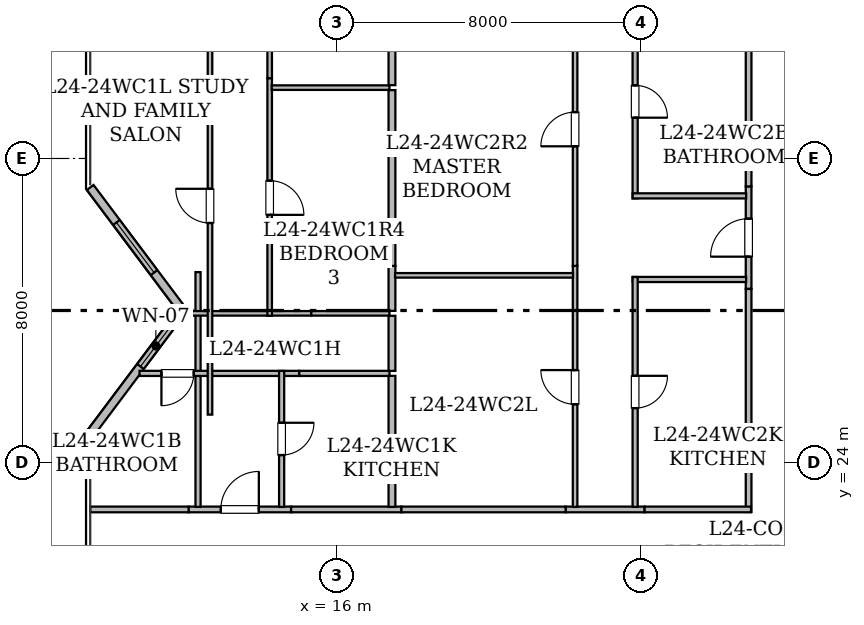
"""IFC4 building model, lengths in metres.
Left out: names, types, materials, properties, quantities, classifications, styles, units other than length and angle.
Written with IfcOpenShell. Run it as: python <this file> out.ifc"""

import sys

from ifc_helpers import new_model, si_unit, direction, frame, frame_2d, origin, place, context, subcontext, project, spatial, rectangle, extrude, element, fill, save


model = new_model("IFC4")
c1 = context("Model", 3, precision=1e-05, world=origin(), true_north=direction((0.0, 1.0)))
c2 = subcontext(c1, "Body", "Model", "MODEL_VIEW")
j1 = project(units=[si_unit("LENGTHUNIT", "METRE"), si_unit("PLANEANGLEUNIT", "RADIAN")], contexts=[c1])
p1 = place(None, origin())
s1 = spatial("IfcSite", under=j1, at=p1, CompositionType="ELEMENT")
p2 = place(p1, origin())
s2 = spatial("IfcBuilding", under=s1, at=p2, CompositionType="ELEMENT")
p3 = place(p2, frame((0.0, 0.0, 98.25)))
s3 = spatial("IfcBuildingStorey", under=s2, at=p3, CompositionType="ELEMENT", Elevation=98.25)
p4 = place(p3, frame((9.544, 24.808, 0.0), z_axis=(0.0, 0.0, 1.0), x_axis=(0.600019580308, 0.799985314394, 0.0)))
e1 = element("IfcWall", 1, at=p4, inside=s3, PredefinedType="STANDARD", context=c2, shape_type="SweptSolid", body=[
    extrude(rectangle(XDim=3.99, YDim=0.22, at=frame_2d((1.995, 0.0))), origin(), (0.0, 0.0, 1.0), 3.43),
])
p5 = place(p4, frame((2.147, 0.0, 0.85)))
e2 = element("IfcOpeningElement", 2, at=p5, cuts=e1, PredefinedType="OPENING", context=c2, shape_type="SweptSolid", body=[
    extrude(rectangle(XDim=1.35, YDim=1.5, at=frame_2d((0.675, 0.75))), frame((0.0, 0.12, 0.0), z_axis=(0.0, -1.0, 0.0), x_axis=(1.0, 0.0, 0.0)), (0.0, 0.0, 1.0), 0.24),
])
p6 = place(p3, frame((11.881, 28.077, 0.0), z_axis=(0.0, 0.0, 1.0), x_axis=(-0.600158184825, 0.799881336942, 0.0)))
e3 = element("IfcWall", 3, at=p6, inside=s3, PredefinedType="STANDARD", context=c2, shape_type="SweptSolid", body=[
    extrude(rectangle(XDim=3.951, YDim=0.22, at=frame_2d((1.975, 0.0))), origin(), (0.0, 0.0, 1.0), 3.43),
])
p7 = place(p6, frame((1.15, 0.0, 0.85)))
e4 = element("IfcOpeningElement", 4, at=p7, cuts=e3, PredefinedType="OPENING", context=c2, shape_type="SweptSolid", body=[
    extrude(rectangle(XDim=1.65, YDim=1.55, at=frame_2d((0.825, 0.775))), frame((0.0, 0.12, 0.0), z_axis=(0.0, -1.0, 0.0), x_axis=(1.0, 0.0, 0.0)), (0.0, 0.0, 1.0), 0.24),
])
p8 = place(p3, frame((12.098, 22.765, 0.0), z_axis=(0.0, 0.0, 1.0), x_axis=(1.0, 0.0, 0.0)))
e5 = element("IfcWall", 5, at=p8, inside=s3, PredefinedType="STANDARD", context=c2, shape_type="SweptSolid", body=[
    extrude(rectangle(XDim=2.698, YDim=0.15, at=frame_2d((1.349, 0.0))), origin(), (0.0, 0.0, 1.0), 2.876),
])
p9 = place(p8, frame((0.849, 0.0, 0.0)))
e6 = element("IfcOpeningElement", 6, at=p9, cuts=e5, PredefinedType="OPENING", context=c2, shape_type="SweptSolid", body=[
    extrude(rectangle(XDim=1.0, YDim=2.15, at=frame_2d((0.5, 1.075))), frame((0.0, 0.085, 0.0), z_axis=(0.0, -1.0, 0.0), x_axis=(1.0, 0.0, 0.0)), (0.0, 0.0, 1.0), 0.17),
])
p10 = place(p3, frame((9.51, 22.765, 0.0), z_axis=(0.0, 0.0, 1.0), x_axis=(1.0, 0.0, 0.0)))
e7 = element("IfcWall", 7, at=p10, inside=s3, PredefinedType="STANDARD", context=c2, shape_type="SweptSolid", body=[
    extrude(rectangle(XDim=2.588, YDim=0.15, at=frame_2d((1.294, 0.0))), origin(), (0.0, 0.0, 1.0), 2.876),
])
p11 = place(p3, frame((14.796, 22.765, 0.0), z_axis=(0.0, 0.0, 1.0), x_axis=(1.0, 0.0, 0.0)))
e8 = element("IfcWall", 8, at=p11, inside=s3, PredefinedType="STANDARD", context=c2, shape_type="SweptSolid", body=[
    extrude(rectangle(XDim=2.903, YDim=0.15, at=frame_2d((1.452, 0.0))), origin(), (0.0, 0.0, 1.0), 3.43),
])
p12 = place(p3, frame((26.835, 28.567, 0.0), z_axis=(0.0, 0.0, 1.0), x_axis=(0.0, 1.0, 0.0)))
e9 = element("IfcWall", 9, at=p12, inside=s3, PredefinedType="STANDARD", context=c2, shape_type="SweptSolid", body=[
    extrude(rectangle(XDim=2.698, YDim=0.15, at=frame_2d((1.349, 0.0))), origin(), (0.0, 0.0, 1.0), 3.43),
])
p13 = place(p12, frame((0.849, 0.0, 0.0)))
e10 = element("IfcOpeningElement", 10, at=p13, cuts=e9, PredefinedType="OPENING", context=c2, shape_type="SweptSolid", body=[
    extrude(rectangle(XDim=1.0, YDim=2.15, at=frame_2d((0.5, 1.075))), frame((0.0, 0.085, 0.0), z_axis=(0.0, -1.0, 0.0), x_axis=(1.0, 0.0, 0.0)), (0.0, 0.0, 1.0), 0.17),
])
p14 = place(p3, frame((22.02, 22.765, 0.0), z_axis=(0.0, 0.0, 1.0), x_axis=(1.0, 0.0, 0.0)))
e11 = element("IfcWall", 11, at=p14, inside=s3, PredefinedType="STANDARD", context=c2, shape_type="SweptSolid", body=[
    extrude(rectangle(XDim=2.078, YDim=0.15, at=frame_2d((1.039, 0.0))), origin(), (0.0, 0.0, 1.0), 3.43),
])
p15 = place(p3, frame((26.835, 31.265, 0.0), z_axis=(0.0, 0.0, 1.0), x_axis=(0.0, 1.0, 0.0)))
e12 = element("IfcWall", 12, at=p15, inside=s3, PredefinedType="STANDARD", context=c2, shape_type="SweptSolid", body=[
    extrude(rectangle(XDim=4.467, YDim=0.15, at=frame_2d((2.233, 0.0))), origin(), (0.0, 0.0, 1.0), 3.43),
])
p16 = place(p3, frame((26.835, 22.7, 0.0), z_axis=(0.0, 0.0, 1.0), x_axis=(0.0, 1.0, 0.0)))
e13 = element("IfcWall", 13, at=p16, inside=s3, PredefinedType="STANDARD", context=c2, shape_type="SweptSolid", body=[
    extrude(rectangle(XDim=5.867, YDim=0.15, at=frame_2d((2.934, 0.0))), origin(), (0.0, 0.0, 1.0), 2.961),
])
p17 = place(p3, frame((24.098, 22.765, 0.0), z_axis=(0.0, 0.0, 1.0), x_axis=(1.0, 0.0, 0.0)))
e14 = element("IfcWall", 14, at=p17, inside=s3, PredefinedType="STANDARD", context=c2, shape_type="SweptSolid", body=[
    extrude(rectangle(XDim=2.8, YDim=0.15, at=frame_2d((1.4, 0.0))), origin(), (0.0, 0.0, 1.0), 3.43),
])
p18 = place(p3, frame((17.699, 22.765, 0.0), z_axis=(0.0, 0.0, 1.0), x_axis=(1.0, 0.0, 0.0)))
e15 = element("IfcWall", 15, at=p18, inside=s3, PredefinedType="STANDARD", context=c2, shape_type="SweptSolid", body=[
    extrude(rectangle(XDim=4.321, YDim=0.15, at=frame_2d((2.161, 0.0))), origin(), (0.0, 0.0, 1.0), 2.647),
])
p19 = place(p3, frame((12.347, 22.832, 0.0), z_axis=(0.0, 0.0, 1.0), x_axis=(0.0, 1.0, 0.0)))
e16 = element("IfcWall", 16, at=p19, inside=s3, PredefinedType="PARTITIONING", context=c2, shape_type="SweptSolid", body=[
    extrude(rectangle(XDim=6.178, YDim=0.135, at=frame_2d((3.089, 0.0))), origin(), (0.0, 0.0, 1.0), 2.876),
])
p20 = place(p3, frame((15.012, 26.345, 0.0), z_axis=(0.0, 0.0, 1.0), x_axis=(-1.0, 0.0, 0.0)))
e17 = element("IfcWall", 17, at=p20, inside=s3, PredefinedType="PARTITIONING", context=c2, shape_type="SweptSolid", body=[
    extrude(rectangle(XDim=4.204, YDim=0.135, at=frame_2d((2.102, 0.0))), origin(), (0.0, 0.0, 1.0), 2.876),
])
p21 = place(p20, frame((2.778, 0.0, 0.0)))
e18 = element("IfcOpeningElement", 18, at=p21, cuts=e17, PredefinedType="OPENING", context=c2, shape_type="SweptSolid", body=[
    extrude(rectangle(XDim=0.85, YDim=2.1, at=frame_2d((0.425, 1.05))), frame((0.0, 0.077, 0.0), z_axis=(0.0, -1.0, 0.0), x_axis=(1.0, 0.0, 0.0)), (0.0, 0.0, 1.0), 0.155),
])
p22 = place(p3, frame((17.385, 26.345, 0.0), z_axis=(0.0, 0.0, 1.0), x_axis=(-1.0, 0.0, 0.0)))
e19 = element("IfcWall", 19, at=p22, inside=s3, PredefinedType="PARTITIONING", context=c2, shape_type="SweptSolid", body=[
    extrude(rectangle(XDim=2.373, YDim=0.135, at=frame_2d((1.187, 0.0))), origin(), (0.0, 0.0, 1.0), 3.43),
])
p23 = place(p3, frame((14.547, 26.41, 0.0), z_axis=(0.0, 0.0, 1.0), x_axis=(0.0, -1.0, 0.0)))
e20 = element("IfcWall", 20, at=p23, inside=s3, PredefinedType="PARTITIONING", context=c2, shape_type="SweptSolid", body=[
    extrude(rectangle(XDim=3.578, YDim=0.135, at=frame_2d((1.789, 0.0))), origin(), (0.0, 0.0, 1.0), 3.43),
])
p24 = place(p23, frame((1.364, 0.0, 0.0)))
e21 = element("IfcOpeningElement", 21, at=p24, cuts=e20, PredefinedType="OPENING", context=c2, shape_type="SweptSolid", body=[
    extrude(rectangle(XDim=0.85, YDim=2.1, at=frame_2d((0.425, 1.05))), frame((0.0, 0.077, 0.0), z_axis=(0.0, -1.0, 0.0), x_axis=(1.0, 0.0, 0.0)), (0.0, 0.0, 1.0), 0.155),
])
p25 = place(p3, frame((11.894, 27.925, 0.0), z_axis=(0.0, 0.0, 1.0), x_axis=(1.0, 0.0, 0.0)))
e22 = element("IfcWall", 22, at=p25, inside=s3, PredefinedType="PARTITIONING", context=c2, shape_type="SweptSolid", body=[
    extrude(rectangle(XDim=3.433, YDim=0.12, at=frame_2d((1.716, 0.0))), origin(), (0.0, 0.0, 1.0), 2.876),
])
p26 = place(p3, frame((12.662, 25.26, 0.0), z_axis=(0.0, 0.0, 1.0), x_axis=(0.0, 1.0, 0.0)))
e23 = element("IfcWall", 23, at=p26, inside=s3, PredefinedType="PARTITIONING", context=c2, shape_type="SweptSolid", body=[
    extrude(rectangle(XDim=8.567, YDim=0.12, at=frame_2d((4.283, 0.0))), origin(), (0.0, 0.0, 1.0), 2.687),
])
p27 = place(p26, frame((5.042, 0.0, 0.0)))
e24 = element("IfcOpeningElement", 24, at=p27, cuts=e23, PredefinedType="OPENING", context=c2, shape_type="SweptSolid", body=[
    extrude(rectangle(XDim=0.9, YDim=2.1, at=frame_2d((0.45, 1.05))), frame((0.0, 0.07, 0.0), z_axis=(0.0, -1.0, 0.0), x_axis=(1.0, 0.0, 0.0)), (0.0, 0.0, 1.0), 0.14),
])
p28 = place(p3, frame((12.662, 33.827, 0.0), z_axis=(0.0, 0.0, 1.0), x_axis=(0.0, 1.0, 0.0)))
e25 = element("IfcWall", 25, at=p28, inside=s3, PredefinedType="PARTITIONING", context=c2, shape_type="SweptSolid", body=[
    extrude(rectangle(XDim=6.817, YDim=0.12, at=frame_2d((3.409, 0.0))), origin(), (0.0, 0.0, 1.0), 2.687),
])
p29 = place(p28, frame((2.055, 0.0, 0.0)))
e26 = element("IfcOpeningElement", 26, at=p29, cuts=e25, PredefinedType="OPENING", context=c2, shape_type="SweptSolid", body=[
    extrude(rectangle(XDim=0.9, YDim=2.1, at=frame_2d((0.45, 1.05))), frame((0.0, 0.07, 0.0), z_axis=(0.0, -1.0, 0.0), x_axis=(1.0, 0.0, 0.0)), (0.0, 0.0, 1.0), 0.14),
])
p30 = place(p3, frame((15.327, 27.925, 0.0), z_axis=(0.0, 0.0, 1.0), x_axis=(1.0, 0.0, 0.0)))
e27 = element("IfcWall", 27, at=p30, inside=s3, PredefinedType="PARTITIONING", context=c2, shape_type="SweptSolid", body=[
    extrude(rectangle(XDim=2.058, YDim=0.12, at=frame_2d((1.029, 0.0))), origin(), (0.0, 0.0, 1.0), 3.43),
])
p31 = place(p3, frame((14.232, 34.113, 0.0), z_axis=(0.0, 0.0, 1.0), x_axis=(0.0, -1.0, 0.0)))
e28 = element("IfcWall", 28, at=p31, inside=s3, PredefinedType="PARTITIONING", context=c2, shape_type="SweptSolid", body=[
    extrude(rectangle(XDim=6.253, YDim=0.12, at=frame_2d((3.126, 0.0))), origin(), (0.0, 0.0, 1.0), 2.687),
])
p32 = place(p31, frame((2.697, 0.0, 0.0)))
e29 = element("IfcOpeningElement", 29, at=p32, cuts=e28, PredefinedType="OPENING", context=c2, shape_type="SweptSolid", body=[
    extrude(rectangle(XDim=0.9, YDim=2.1, at=frame_2d((0.45, 1.05))), frame((0.0, 0.07, 0.0), z_axis=(0.0, -1.0, 0.0), x_axis=(1.0, 0.0, 0.0)), (0.0, 0.0, 1.0), 0.14),
])
p33 = place(p3, frame((14.232, 41.28, 0.0), z_axis=(0.0, 0.0, 1.0), x_axis=(0.0, -1.0, 0.0)))
e30 = element("IfcWall", 30, at=p33, inside=s3, PredefinedType="PARTITIONING", context=c2, shape_type="SweptSolid", body=[
    extrude(rectangle(XDim=7.167, YDim=0.12, at=frame_2d((3.583, 0.0))), origin(), (0.0, 0.0, 1.0), 2.687),
])
p34 = place(p33, frame((3.154, 0.0, 0.0)))
e31 = element("IfcOpeningElement", 31, at=p34, cuts=e30, PredefinedType="OPENING", context=c2, shape_type="SweptSolid", body=[
    extrude(rectangle(XDim=0.9, YDim=2.1, at=frame_2d((0.45, 1.05))), frame((0.0, 0.07, 0.0), z_axis=(0.0, -1.0, 0.0), x_axis=(1.0, 0.0, 0.0)), (0.0, 0.0, 1.0), 0.14),
])
p35 = place(p3, frame((17.45, 27.86, 0.0), z_axis=(0.0, 0.0, 1.0), x_axis=(0.0, -1.0, 0.0)))
e32 = element("IfcWall", 32, at=p35, inside=s3, PredefinedType="STANDARD", context=c2, shape_type="SweptSolid", body=[
    extrude(rectangle(XDim=1.45, YDim=0.18, at=frame_2d((0.725, 0.0))), origin(), (0.0, 0.0, 1.0), 3.43),
])
p36 = place(p3, frame((17.45, 26.28, 0.0), z_axis=(0.0, 0.0, 1.0), x_axis=(0.0, -1.0, 0.0)))
e33 = element("IfcWall", 33, at=p36, inside=s3, PredefinedType="STANDARD", context=c2, shape_type="SweptSolid", body=[
    extrude(rectangle(XDim=3.448, YDim=0.18, at=frame_2d((1.724, 0.0))), origin(), (0.0, 0.0, 1.0), 3.43),
])
p37 = place(p3, frame((9.51, 33.578, 0.0), z_axis=(0.0, 0.0, 1.0), x_axis=(1.0, 0.0, 0.0)))
e34 = element("IfcWall", 34, at=p37, inside=s3, PredefinedType="PARTITIONING", context=c2, shape_type="SweptSolid", body=[
    extrude(rectangle(XDim=3.098, YDim=0.12, at=frame_2d((1.549, 0.0))), origin(), (0.0, 0.0, 1.0), 2.687),
])
p38 = place(p3, frame((14.286, 33.864, 0.0), z_axis=(0.0, 0.0, 1.0), x_axis=(1.0, 0.0, 0.0)))
e35 = element("IfcWall", 35, at=p38, inside=s3, PredefinedType="PARTITIONING", context=c2, shape_type="SweptSolid", body=[
    extrude(rectangle(XDim=3.099, YDim=0.12, at=frame_2d((1.55, 0.0))), origin(), (0.0, 0.0, 1.0), 3.43),
])
p39 = place(p3, frame((17.45, 29.174, 0.0), z_axis=(0.0, 0.0, 1.0), x_axis=(0.0, -1.0, 0.0)))
e36 = element("IfcWall", 36, at=p39, inside=s3, PredefinedType="STANDARD", context=c2, shape_type="SweptSolid", body=[
    extrude(rectangle(XDim=1.184, YDim=0.18, at=frame_2d((0.592, 0.0))), origin(), (0.0, 0.0, 1.0), 3.43),
])
p40 = place(p3, frame((17.45, 33.799, 0.0), z_axis=(0.0, 0.0, 1.0), x_axis=(0.0, -1.0, 0.0)))
e37 = element("IfcWall", 37, at=p40, inside=s3, PredefinedType="STANDARD", context=c2, shape_type="SweptSolid", body=[
    extrude(rectangle(XDim=4.625, YDim=0.18, at=frame_2d((2.312, 0.0))), origin(), (0.0, 0.0, 1.0), 2.687),
])
p41 = place(p3, frame((17.45, 36.409, 0.0), z_axis=(0.0, 0.0, 1.0), x_axis=(0.0, -1.0, 0.0)))
e38 = element("IfcWall", 38, at=p41, inside=s3, PredefinedType="STANDARD", context=c2, shape_type="SweptSolid", body=[
    extrude(rectangle(XDim=2.48, YDim=0.18, at=frame_2d((1.24, 0.0))), origin(), (0.0, 0.0, 1.0), 3.43),
])
p42 = place(p3, frame((23.849, 36.046, 0.0), z_axis=(0.0, 0.0, 1.0), x_axis=(0.0, -1.0, 0.0)))
e39 = element("IfcWall", 39, at=p42, inside=s3, PredefinedType="PARTITIONING", context=c2, shape_type="SweptSolid", body=[
    extrude(rectangle(XDim=5.095, YDim=0.135, at=frame_2d((2.547, 0.0))), origin(), (0.0, 0.0, 1.0), 3.43),
])
p43 = place(p42, frame((2.123, 0.0, 0.0)))
e40 = element("IfcOpeningElement", 40, at=p43, cuts=e39, PredefinedType="OPENING", context=c2, shape_type="SweptSolid", body=[
    extrude(rectangle(XDim=0.85, YDim=2.1, at=frame_2d((0.425, 1.05))), frame((0.0, 0.077, 0.0), z_axis=(0.0, -1.0, 0.0), x_axis=(1.0, 0.0, 0.0)), (0.0, 0.0, 1.0), 0.155),
])
for number, where, z_axis, x_axis in (
    (41, (23.784, 31.016, 0.0), (0.0, 0.0, 1.0), (1.0, 0.0, 0.0)),
    (42, (26.77, 28.816, 0.0), (0.0, 0.0, 1.0), (-1.0, 0.0, 0.0)),
):
    element("IfcWall", number, at=place(p3, frame(where, z_axis=z_axis, x_axis=x_axis)), inside=s3, PredefinedType="PARTITIONING", context=c2, shape_type="SweptSolid", body=[
        extrude(rectangle(XDim=2.986, YDim=0.135, at=frame_2d((1.493, 0.0))), origin(), (0.0, 0.0, 1.0), 3.43),
    ])
p44 = place(p3, frame((23.849, 28.881, 0.0), z_axis=(0.0, 0.0, 1.0), x_axis=(0.0, -1.0, 0.0)))
e43 = element("IfcWall", 43, at=p44, inside=s3, PredefinedType="PARTITIONING", context=c2, shape_type="SweptSolid", body=[
    extrude(rectangle(XDim=6.049, YDim=0.135, at=frame_2d((3.024, 0.0))), origin(), (0.0, 0.0, 1.0), 2.961),
])
p45 = place(p44, frame((2.6, 0.0, 0.0)))
e44 = element("IfcOpeningElement", 44, at=p45, cuts=e43, PredefinedType="OPENING", context=c2, shape_type="SweptSolid", body=[
    extrude(rectangle(XDim=0.85, YDim=2.1, at=frame_2d((0.425, 1.05))), frame((0.0, 0.077, 0.0), z_axis=(0.0, -1.0, 0.0), x_axis=(1.0, 0.0, 0.0)), (0.0, 0.0, 1.0), 0.155),
])
p46 = place(p3, frame((22.269, 22.832, 0.0), z_axis=(0.0, 0.0, 1.0), x_axis=(0.0, 1.0, 0.0)))
e45 = element("IfcWall", 45, at=p46, inside=s3, PredefinedType="PARTITIONING", context=c2, shape_type="SweptSolid", body=[
    extrude(rectangle(XDim=6.342, YDim=0.12, at=frame_2d((3.171, 0.0))), origin(), (0.0, 0.0, 1.0), 2.961),
])
p47 = place(p46, frame((2.7, 0.0, 0.0)))
e46 = element("IfcOpeningElement", 46, at=p47, cuts=e45, PredefinedType="OPENING", context=c2, shape_type="SweptSolid", body=[
    extrude(rectangle(XDim=0.9, YDim=2.1, at=frame_2d((0.45, 1.05))), frame((0.0, 0.07, 0.0), z_axis=(0.0, -1.0, 0.0), x_axis=(1.0, 0.0, 0.0)), (0.0, 0.0, 1.0), 0.14),
])
p48 = place(p3, frame((22.269, 29.174, 0.0), z_axis=(0.0, 0.0, 1.0), x_axis=(0.0, 1.0, 0.0)))
e47 = element("IfcWall", 47, at=p48, inside=s3, PredefinedType="PARTITIONING", context=c2, shape_type="SweptSolid", body=[
    extrude(rectangle(XDim=7.235, YDim=0.12, at=frame_2d((3.617, 0.0))), origin(), (0.0, 0.0, 1.0), 3.43),
])
p49 = place(p48, frame((3.146, 0.0, 0.0)))
e48 = element("IfcOpeningElement", 48, at=p49, cuts=e47, PredefinedType="OPENING", context=c2, shape_type="SweptSolid", body=[
    extrude(rectangle(XDim=0.9, YDim=2.1, at=frame_2d((0.45, 1.05))), frame((0.0, 0.07, 0.0), z_axis=(0.0, -1.0, 0.0), x_axis=(1.0, 0.0, 0.0)), (0.0, 0.0, 1.0), 0.14),
])
p50 = place(p3, frame((17.532, 28.925, 0.0), z_axis=(0.0, 0.0, 1.0), x_axis=(1.0, 0.0, 0.0)))
e49 = element("IfcWall", 49, at=p50, inside=s3, PredefinedType="PARTITIONING", context=c2, shape_type="SweptSolid", body=[
    extrude(rectangle(XDim=4.683, YDim=0.12, at=frame_2d((2.342, 0.0))), origin(), (0.0, 0.0, 1.0), 2.647),
])
p51 = place(p5, origin())
e50 = element("IfcWindow", 50, at=p51, inside=s3, PartitioningType="SINGLE_PANEL", PredefinedType="WINDOW", context=c2, shape_type="SweptSolid", body=[
    extrude(rectangle(XDim=1.35, YDim=1.5, at=frame_2d((0.675, 0.75))), frame((0.0, 0.03, 0.0), z_axis=(0.0, -1.0, 0.0), x_axis=(1.0, 0.0, 0.0)), (0.0, 0.0, 1.0), 0.06),
])
fill(e2, e50)
p52 = place(p7, origin())
e51 = element("IfcWindow", 51, at=p52, inside=s3, PartitioningType="SINGLE_PANEL", PredefinedType="WINDOW", context=c2, shape_type="SweptSolid", body=[
    extrude(rectangle(XDim=1.65, YDim=1.55, at=frame_2d((0.825, 0.775))), frame((0.0, 0.03, 0.0), z_axis=(0.0, -1.0, 0.0), x_axis=(1.0, 0.0, 0.0)), (0.0, 0.0, 1.0), 0.06),
])
fill(e4, e51)
p53 = place(p9, origin())
e52 = element("IfcDoor", 52, at=p53, inside=s3, OperationType="SINGLE_SWING_RIGHT", PredefinedType="DOOR", context=c2, shape_type="SweptSolid", body=[
    extrude(rectangle(XDim=1.0, YDim=2.15, at=frame_2d((0.5, 1.075))), frame((0.0, 0.025, 0.0), z_axis=(0.0, -1.0, 0.0), x_axis=(1.0, 0.0, 0.0)), (0.0, 0.0, 1.0), 0.05),
])
fill(e6, e52)
p54 = place(p13, origin())
e53 = element("IfcDoor", 53, at=p54, inside=s3, OperationType="SINGLE_SWING_LEFT", PredefinedType="DOOR", context=c2, shape_type="SweptSolid", body=[
    extrude(rectangle(XDim=1.0, YDim=2.15, at=frame_2d((0.5, 1.075))), frame((0.0, 0.025, 0.0), z_axis=(0.0, -1.0, 0.0), x_axis=(1.0, 0.0, 0.0)), (0.0, 0.0, 1.0), 0.05),
])
fill(e10, e53)
p55 = place(p21, origin())
e54 = element("IfcDoor", 54, at=p55, inside=s3, OperationType="SINGLE_SWING_RIGHT", PredefinedType="DOOR", context=c2, shape_type="SweptSolid", body=[
    extrude(rectangle(XDim=0.85, YDim=2.1, at=frame_2d((0.425, 1.05))), frame((0.0, 0.025, 0.0), z_axis=(0.0, -1.0, 0.0), x_axis=(1.0, 0.0, 0.0)), (0.0, 0.0, 1.0), 0.05),
])
fill(e18, e54)
p56 = place(p24, origin())
e55 = element("IfcDoor", 55, at=p56, inside=s3, OperationType="SINGLE_SWING_LEFT", PredefinedType="DOOR", context=c2, shape_type="SweptSolid", body=[
    extrude(rectangle(XDim=0.85, YDim=2.1, at=frame_2d((0.425, 1.05))), frame((0.0, 0.025, 0.0), z_axis=(0.0, -1.0, 0.0), x_axis=(1.0, 0.0, 0.0)), (0.0, 0.0, 1.0), 0.05),
])
fill(e21, e55)
p57 = place(p27, origin())
e56 = element("IfcDoor", 56, at=p57, inside=s3, OperationType="SINGLE_SWING_RIGHT", PredefinedType="DOOR", context=c2, shape_type="SweptSolid", body=[
    extrude(rectangle(XDim=0.9, YDim=2.1, at=frame_2d((0.45, 1.05))), frame((0.0, 0.025, 0.0), z_axis=(0.0, -1.0, 0.0), x_axis=(1.0, 0.0, 0.0)), (0.0, 0.0, 1.0), 0.05),
])
fill(e24, e56)
p58 = place(p32, origin())
e57 = element("IfcDoor", 57, at=p58, inside=s3, OperationType="SINGLE_SWING_RIGHT", PredefinedType="DOOR", context=c2, shape_type="SweptSolid", body=[
    extrude(rectangle(XDim=0.9, YDim=2.1, at=frame_2d((0.45, 1.05))), frame((0.0, 0.025, 0.0), z_axis=(0.0, -1.0, 0.0), x_axis=(1.0, 0.0, 0.0)), (0.0, 0.0, 1.0), 0.05),
])
fill(e29, e57)
p59 = place(p43, origin())
e58 = element("IfcDoor", 58, at=p59, inside=s3, OperationType="SINGLE_SWING_RIGHT", PredefinedType="DOOR", context=c2, shape_type="SweptSolid", body=[
    extrude(rectangle(XDim=0.85, YDim=2.1, at=frame_2d((0.425, 1.05))), frame((0.0, 0.025, 0.0), z_axis=(0.0, -1.0, 0.0), x_axis=(1.0, 0.0, 0.0)), (0.0, 0.0, 1.0), 0.05),
])
fill(e40, e58)
p60 = place(p45, origin())
e59 = element("IfcDoor", 59, at=p60, inside=s3, OperationType="SINGLE_SWING_LEFT", PredefinedType="DOOR", context=c2, shape_type="SweptSolid", body=[
    extrude(rectangle(XDim=0.85, YDim=2.1, at=frame_2d((0.425, 1.05))), frame((0.0, 0.025, 0.0), z_axis=(0.0, -1.0, 0.0), x_axis=(1.0, 0.0, 0.0)), (0.0, 0.0, 1.0), 0.05),
])
fill(e44, e59)
p61 = place(p47, origin())
e60 = element("IfcDoor", 60, at=p61, inside=s3, OperationType="SINGLE_SWING_RIGHT", PredefinedType="DOOR", context=c2, shape_type="SweptSolid", body=[
    extrude(rectangle(XDim=0.9, YDim=2.1, at=frame_2d((0.45, 1.05))), frame((0.0, 0.025, 0.0), z_axis=(0.0, -1.0, 0.0), x_axis=(1.0, 0.0, 0.0)), (0.0, 0.0, 1.0), 0.05),
])
fill(e46, e60)
p62 = place(p49, origin())
e61 = element("IfcDoor", 61, at=p62, inside=s3, OperationType="SINGLE_SWING_LEFT", PredefinedType="DOOR", context=c2, shape_type="SweptSolid", body=[
    extrude(rectangle(XDim=0.9, YDim=2.1, at=frame_2d((0.45, 1.05))), frame((0.0, 0.025, 0.0), z_axis=(0.0, -1.0, 0.0), x_axis=(1.0, 0.0, 0.0)), (0.0, 0.0, 1.0), 0.05),
])
fill(e48, e61)
save(model, sys.argv[1])
